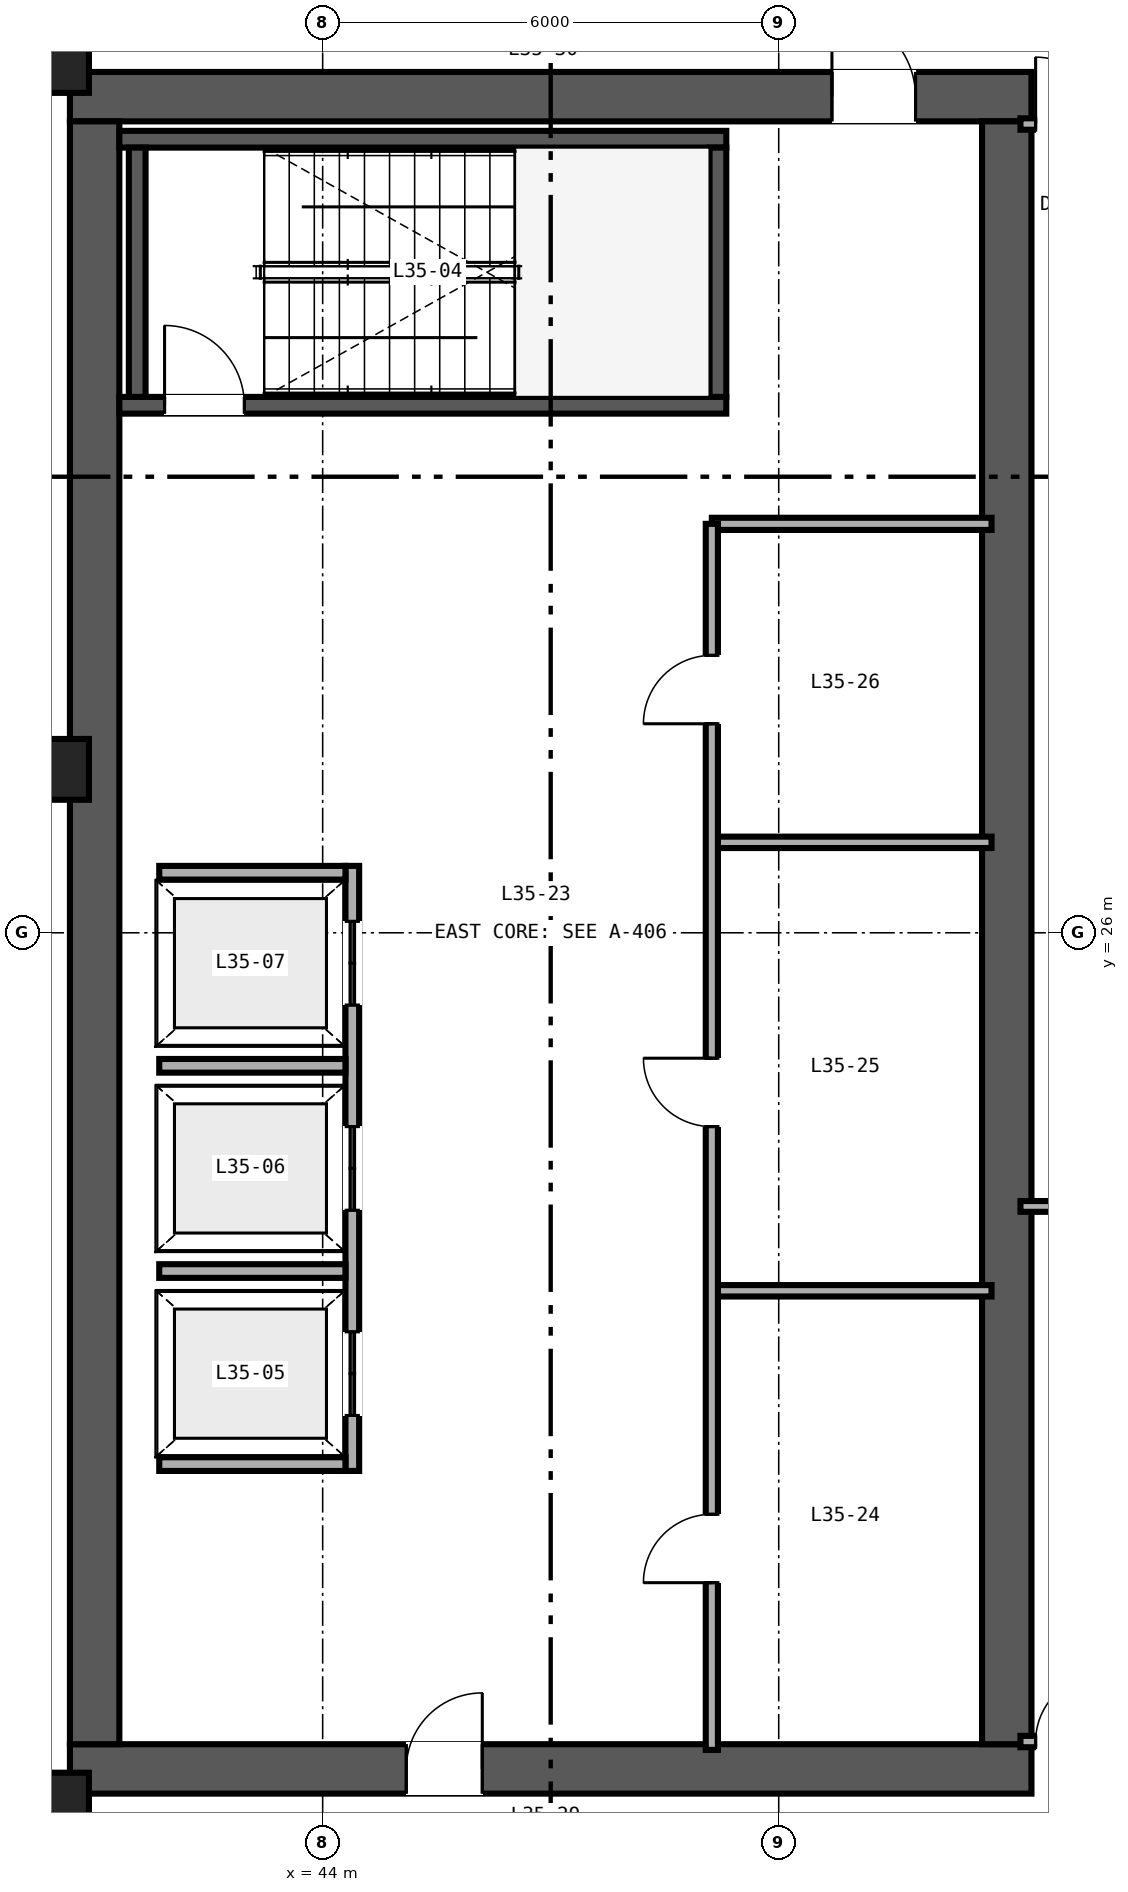
"""IFC4 building model, lengths in metres.
Left out: names, types, materials, properties, quantities, classifications, styles, units other than length and angle.
Written with IfcOpenShell. Run it as: python <this file> out.ifc"""

import sys

from ifc_helpers import new_model, si_unit, direction, frame, frame_2d, origin, origin_2d, place, context, subcontext, project, spatial, rectangle, hollow_rectangle, extrude, source, transform, mapped, element, fill, save


model = new_model("IFC4")
c1 = context("Model", 3, precision=1e-05, world=origin(), true_north=direction((0.0, 1.0)))
c2 = subcontext(c1, "Body", "Model", "MODEL_VIEW")
j1 = project(units=[si_unit("LENGTHUNIT", "METRE"), si_unit("PLANEANGLEUNIT", "RADIAN")], contexts=[c1])
p1 = place(None, origin())
s1 = spatial("IfcSite", under=j1, at=p1, CompositionType="ELEMENT")
p2 = place(p1, origin())
s2 = spatial("IfcBuilding", under=s1, at=p2, CompositionType="ELEMENT")
p3 = place(p2, frame((0.0, 0.0, 140.4)))
s3 = spatial("IfcBuildingStorey", under=s2, at=p3, CompositionType="ELEMENT", Elevation=140.4)
p4 = place(p3, frame((40.675, 15.0, 0.0), z_axis=(0.0, 0.0, 1.0), x_axis=(1.0, 0.0, 0.0)))
e1 = element("IfcWall", 1, at=p4, inside=s3, PredefinedType="SHEAR", context=c2, shape_type="SweptSolid", body=[
    extrude(rectangle(XDim=12.65, YDim=0.65, at=frame_2d((6.325, 0.0))), origin(), (0.0, 0.0, 1.0), 3.36),
])
p5 = place(p4, frame((4.425, 0.0, 0.0)))
e2 = element("IfcOpeningElement", 2, at=p5, cuts=e1, PredefinedType="OPENING", context=c2, shape_type="SweptSolid", body=[
    extrude(rectangle(XDim=1.0, YDim=2.15, at=frame_2d((0.5, 1.075))), frame((0.0, 0.335, 0.0), z_axis=(0.0, -1.0, 0.0), x_axis=(1.0, 0.0, 0.0)), (0.0, 0.0, 1.0), 0.67),
])
p6 = place(p3, frame((40.675, 37.0, 0.0), z_axis=(0.0, 0.0, 1.0), x_axis=(1.0, 0.0, 0.0)))
e3 = element("IfcWall", 3, at=p6, inside=s3, PredefinedType="SHEAR", context=c2, shape_type="SweptSolid", body=[
    extrude(rectangle(XDim=12.65, YDim=0.65, at=frame_2d((6.325, 0.0))), origin(), (0.0, 0.0, 1.0), 3.36),
])
p7 = place(p6, frame((10.025, 0.0, 0.0)))
e4 = element("IfcOpeningElement", 4, at=p7, cuts=e3, PredefinedType="OPENING", context=c2, shape_type="SweptSolid", body=[
    extrude(rectangle(XDim=1.1, YDim=2.15, at=frame_2d((0.55, 1.075))), frame((0.0, 0.335, 0.0), z_axis=(0.0, -1.0, 0.0), x_axis=(1.0, 0.0, 0.0)), (0.0, 0.0, 1.0), 0.67),
])
for number, where, z_axis, x_axis in (
    (5, (41.0, 15.325, 0.0), (0.0, 0.0, 1.0), (0.0, 1.0, 0.0)),
    (6, (53.0, 15.325, 0.0), (0.0, 0.0, 1.0), (0.0, 1.0, 0.0)),
):
    element("IfcWall", number, at=place(p3, frame(where, z_axis=z_axis, x_axis=x_axis)), inside=s3, PredefinedType="SHEAR", context=c2, shape_type="SweptSolid", body=[
        extrude(rectangle(XDim=21.35, YDim=0.65, at=frame_2d((10.675, 0.0))), origin(), (0.0, 0.0, 1.0), 3.36),
    ])
p8 = place(p3, frame((41.325, 32.94, 0.0), z_axis=(0.0, 0.0, 1.0), x_axis=(1.0, 0.0, 0.0)))
e7 = element("IfcWall", 7, at=p8, inside=s3, PredefinedType="SHEAR", context=c2, shape_type="SweptSolid", body=[
    extrude(rectangle(XDim=7.985, YDim=0.22, at=frame_2d((3.993, 0.0))), origin(), (0.0, 0.0, 1.0), 3.4),
])
p9 = place(p8, frame((0.595, 0.0, 0.0)))
e8 = element("IfcOpeningElement", 8, at=p9, cuts=e7, PredefinedType="OPENING", context=c2, shape_type="SweptSolid", body=[
    extrude(rectangle(XDim=1.05, YDim=2.15, at=frame_2d((0.525, 1.075))), frame((0.0, 0.12, 0.0), z_axis=(0.0, -1.0, 0.0), x_axis=(1.0, 0.0, 0.0)), (0.0, 0.0, 1.0), 0.24),
])
p10 = place(p3, frame((41.325, 36.44, 0.0), z_axis=(0.0, 0.0, 1.0), x_axis=(1.0, 0.0, 0.0)))
e9 = element("IfcWall", 9, at=p10, inside=s3, PredefinedType="SHEAR", context=c2, shape_type="SweptSolid", body=[
    extrude(rectangle(XDim=7.985, YDim=0.22, at=frame_2d((3.993, 0.0))), origin(), (0.0, 0.0, 1.0), 3.4),
])
for number, where, z_axis, x_axis in (
    (10, (41.56, 33.05, 0.0), (0.0, 0.0, 1.0), (0.0, 1.0, 0.0)),
    (11, (49.2, 33.05, 0.0), (0.0, 0.0, 1.0), (0.0, 1.0, 0.0)),
):
    element("IfcWall", number, at=place(p3, frame(where, z_axis=z_axis, x_axis=x_axis)), inside=s3, PredefinedType="SHEAR", context=c2, shape_type="SweptSolid", body=[
        extrude(rectangle(XDim=3.28, YDim=0.22, at=frame_2d((1.64, 0.0))), origin(), (0.0, 0.0, 1.0), 3.4),
    ])
m1 = source(origin(), c2, "Body", "SweptSolid", [
    extrude(hollow_rectangle(XDim=0.85, YDim=0.8, WallThickness=0.032, at=origin_2d()), origin(), (0.0, 0.0, 1.0), 3.36),
])
for number, where, z_axis, x_axis in (
    (12, (40.5, 14.55, 0.0), (0.0, 0.0, 1.0), (1.0, 0.0, 0.0)),
    (13, (40.5, 28.15, 0.0), (0.0, 0.0, 1.0), (1.0, 0.0, 0.0)),
    (14, (40.5, 37.45, 0.0), (0.0, 0.0, 1.0), (1.0, 0.0, 0.0)),
):
    element("IfcColumn", number, at=place(p3, frame(where, z_axis=z_axis, x_axis=x_axis)), inside=s3, PredefinedType="COLUMN", context=c2, shape_type="MappedRepresentation", body=[
        mapped(m1, transform((0.0, 0.0, 0.0), scale=1.0)),
    ])
p11 = place(p3, frame((44.39, 18.92, 0.0), z_axis=(0.0, 0.0, 1.0), x_axis=(0.0, 1.0, 0.0)))
e15 = element("IfcWall", 15, at=p11, inside=s3, PredefinedType="SOLIDWALL", context=c2, shape_type="SweptSolid", body=[
    extrude(rectangle(XDim=7.96, YDim=0.18, at=frame_2d((3.98, 0.0))), origin(), (0.0, 0.0, 1.0), 3.36),
])
p12 = place(p11, frame((0.73, 0.0, 0.0)))
e16 = element("IfcOpeningElement", 16, at=p12, cuts=e15, PredefinedType="OPENING", context=c2, shape_type="SweptSolid", body=[
    extrude(rectangle(XDim=1.1, YDim=2.2, at=frame_2d((0.55, 1.1))), frame((0.0, 0.1, 0.0), z_axis=(0.0, -1.0, 0.0), x_axis=(1.0, 0.0, 0.0)), (0.0, 0.0, 1.0), 0.2),
])
p13 = place(p11, frame((3.43, 0.0, 0.0)))
e17 = element("IfcOpeningElement", 17, at=p13, cuts=e15, PredefinedType="OPENING", context=c2, shape_type="SweptSolid", body=[
    extrude(rectangle(XDim=1.1, YDim=2.2, at=frame_2d((0.55, 1.1))), frame((0.0, 0.1, 0.0), z_axis=(0.0, -1.0, 0.0), x_axis=(1.0, 0.0, 0.0)), (0.0, 0.0, 1.0), 0.2),
])
p14 = place(p11, frame((6.13, 0.0, 0.0)))
e18 = element("IfcOpeningElement", 18, at=p14, cuts=e15, PredefinedType="OPENING", context=c2, shape_type="SweptSolid", body=[
    extrude(rectangle(XDim=1.1, YDim=2.2, at=frame_2d((0.55, 1.1))), frame((0.0, 0.1, 0.0), z_axis=(0.0, -1.0, 0.0), x_axis=(1.0, 0.0, 0.0)), (0.0, 0.0, 1.0), 0.2),
])
for number, where, z_axis, x_axis in (
    (19, (41.85, 19.01, 0.0), (0.0, 0.0, 1.0), (1.0, 0.0, 0.0)),
    (20, (41.85, 26.79, 0.0), (0.0, 0.0, 1.0), (1.0, 0.0, 0.0)),
    (21, (41.85, 21.55, 0.0), (0.0, 0.0, 1.0), (1.0, 0.0, 0.0)),
    (22, (41.85, 24.25, 0.0), (0.0, 0.0, 1.0), (1.0, 0.0, 0.0)),
):
    element("IfcWall", number, at=place(p3, frame(where, z_axis=z_axis, x_axis=x_axis)), inside=s3, PredefinedType="SOLIDWALL", context=c2, shape_type="SweptSolid", body=[
        extrude(rectangle(XDim=2.45, YDim=0.18, at=frame_2d((1.225, 0.0))), origin(), (0.0, 0.0, 1.0), 3.36),
    ])
p15 = place(p3, frame((49.12, 31.38, 0.0), z_axis=(0.0, 0.0, 1.0), x_axis=(1.0, 0.0, 0.0)))
e23 = element("IfcWall", 23, at=p15, inside=s3, PredefinedType="PARTITIONING", context=c2, shape_type="SweptSolid", body=[
    extrude(rectangle(XDim=3.68, YDim=0.16, at=frame_2d((1.84, 0.0))), origin(), (0.0, 0.0, 1.0), 2.36),
])
for number, where, z_axis, x_axis in (
    (24, (49.12, 21.29, 0.0), (0.0, 0.0, 1.0), (1.0, 0.0, 0.0)),
    (25, (49.12, 27.19, 0.0), (0.0, 0.0, 1.0), (1.0, 0.0, 0.0)),
):
    element("IfcWall", number, at=place(p3, frame(where, z_axis=z_axis, x_axis=x_axis)), inside=s3, PredefinedType="PARTITIONING", context=c2, shape_type="SweptSolid", body=[
        extrude(rectangle(XDim=3.68, YDim=0.15, at=frame_2d((1.84, 0.0))), origin(), (0.0, 0.0, 1.0), 3.36),
    ])
p16 = place(p3, frame((49.12, 15.25, 0.0), z_axis=(0.0, 0.0, 1.0), x_axis=(0.0, 1.0, 0.0)))
e26 = element("IfcWall", 26, at=p16, inside=s3, PredefinedType="PARTITIONING", context=c2, shape_type="SweptSolid", body=[
    extrude(rectangle(XDim=16.13, YDim=0.16, at=frame_2d((8.065, 0.0))), origin(), (0.0, 0.0, 1.0), 2.36),
])
p17 = place(p16, frame((2.2, 0.0, 0.0)))
e27 = element("IfcOpeningElement", 27, at=p17, cuts=e26, PredefinedType="OPENING", context=c2, shape_type="SweptSolid", body=[
    extrude(rectangle(XDim=0.9, YDim=2.15, at=frame_2d((0.45, 1.075))), frame((0.0, 0.09, 0.0), z_axis=(0.0, -1.0, 0.0), x_axis=(1.0, 0.0, 0.0)), (0.0, 0.0, 1.0), 0.18),
])
p18 = place(p16, frame((8.2, 0.0, 0.0)))
e28 = element("IfcOpeningElement", 28, at=p18, cuts=e26, PredefinedType="OPENING", context=c2, shape_type="SweptSolid", body=[
    extrude(rectangle(XDim=0.9, YDim=2.15, at=frame_2d((0.45, 1.075))), frame((0.0, 0.09, 0.0), z_axis=(0.0, -1.0, 0.0), x_axis=(1.0, 0.0, 0.0)), (0.0, 0.0, 1.0), 0.18),
])
p19 = place(p16, frame((13.5, 0.0, 0.0)))
e29 = element("IfcOpeningElement", 29, at=p19, cuts=e26, PredefinedType="OPENING", context=c2, shape_type="SweptSolid", body=[
    extrude(rectangle(XDim=0.9, YDim=2.15, at=frame_2d((0.45, 1.075))), frame((0.0, 0.09, 0.0), z_axis=(0.0, -1.0, 0.0), x_axis=(1.0, 0.0, 0.0)), (0.0, 0.0, 1.0), 0.18),
])
p20 = place(p3, frame((53.18, 15.36, 0.0), z_axis=(0.0, 0.0, 1.0), x_axis=(1.0, 0.0, 0.0)))
e30 = element("IfcWall", 30, at=p20, inside=s3, PredefinedType="PARTITIONING", context=c2, shape_type="SweptSolid", body=[
    extrude(rectangle(XDim=2.66, YDim=0.15, at=frame_2d((1.33, 0.0))), origin(), (0.0, 0.0, 1.0), 2.581),
])
p21 = place(p20, frame((0.2, 0.0, 0.0)))
e31 = element("IfcOpeningElement", 31, at=p21, cuts=e30, PredefinedType="OPENING", context=c2, shape_type="SweptSolid", body=[
    extrude(rectangle(XDim=0.88, YDim=2.15, at=frame_2d((0.44, 1.075))), frame((0.0, 0.085, 0.0), z_axis=(0.0, -1.0, 0.0), x_axis=(1.0, 0.0, 0.0)), (0.0, 0.0, 1.0), 0.17),
])
p22 = place(p3, frame((53.18, 36.64, 0.0), z_axis=(0.0, 0.0, 1.0), x_axis=(1.0, 0.0, 0.0)))
e32 = element("IfcWall", 32, at=p22, inside=s3, PredefinedType="PARTITIONING", context=c2, shape_type="SweptSolid", body=[
    extrude(rectangle(XDim=2.66, YDim=0.15, at=frame_2d((1.33, 0.0))), origin(), (0.0, 0.0, 1.0), 2.743),
])
p23 = place(p22, frame((0.2, 0.0, 0.0)))
e33 = element("IfcOpeningElement", 33, at=p23, cuts=e32, PredefinedType="OPENING", context=c2, shape_type="SweptSolid", body=[
    extrude(rectangle(XDim=0.88, YDim=2.15, at=frame_2d((0.44, 1.075))), frame((0.0, 0.085, 0.0), z_axis=(0.0, -1.0, 0.0), x_axis=(1.0, 0.0, 0.0)), (0.0, 0.0, 1.0), 0.17),
])
p24 = place(p3, frame((53.18, 22.4, 0.0), z_axis=(0.0, 0.0, 1.0), x_axis=(1.0, 0.0, 0.0)))
e34 = element("IfcWall", 34, at=p24, inside=s3, PredefinedType="PARTITIONING", context=c2, shape_type="SweptSolid", body=[
    extrude(rectangle(XDim=2.66, YDim=0.142, at=frame_2d((1.33, 0.0))), origin(), (0.0, 0.0, 1.0), 2.581),
])
m2 = source(origin(), c2, "Body", "SweptSolid", [
    extrude(rectangle(XDim=1.05, YDim=2.15, at=frame_2d((0.525, 1.075))), frame((0.0, 0.025, 0.0), z_axis=(0.0, -1.0, 0.0), x_axis=(1.0, 0.0, 0.0)), (0.0, 0.0, 1.0), 0.05),
])
p25 = place(p9, origin())
e35 = element("IfcDoor", 35, at=p25, inside=s3, OperationType="SINGLE_SWING_LEFT", PredefinedType="DOOR", context=c2, shape_type="MappedRepresentation", body=[
    mapped(m2, transform((0.0, 0.0, 0.0), scale=1.0)),
])
fill(e8, e35)
m3 = source(origin(), c2, "Body", "SweptSolid", [
    extrude(rectangle(XDim=1.1, YDim=2.2, at=frame_2d((0.55, 1.1))), frame((0.0, 0.025, 0.0), z_axis=(0.0, -1.0, 0.0), x_axis=(1.0, 0.0, 0.0)), (0.0, 0.0, 1.0), 0.05),
])
p26 = place(p12, origin())
e36 = element("IfcDoor", 36, at=p26, inside=s3, OperationType="DOUBLE_DOOR_SLIDING", PredefinedType="DOOR", context=c2, shape_type="MappedRepresentation", body=[
    mapped(m3, transform((0.0, 0.0, 0.0), scale=1.0)),
])
fill(e16, e36)
p27 = place(p13, origin())
e37 = element("IfcDoor", 37, at=p27, inside=s3, OperationType="DOUBLE_DOOR_SLIDING", PredefinedType="DOOR", context=c2, shape_type="MappedRepresentation", body=[
    mapped(m3, transform((0.0, 0.0, 0.0), scale=1.0)),
])
fill(e17, e37)
p28 = place(p14, origin())
e38 = element("IfcDoor", 38, at=p28, inside=s3, OperationType="DOUBLE_DOOR_SLIDING", PredefinedType="DOOR", context=c2, shape_type="MappedRepresentation", body=[
    mapped(m3, transform((0.0, 0.0, 0.0), scale=1.0)),
])
fill(e18, e38)
m4 = source(origin(), c2, "Body", "SweptSolid", [
    extrude(rectangle(XDim=1.0, YDim=2.15, at=frame_2d((0.5, 1.075))), frame((0.0, 0.025, 0.0), z_axis=(0.0, -1.0, 0.0), x_axis=(1.0, 0.0, 0.0)), (0.0, 0.0, 1.0), 0.05),
])
p29 = place(p5, origin())
e39 = element("IfcDoor", 39, at=p29, inside=s3, OperationType="SINGLE_SWING_RIGHT", PredefinedType="DOOR", context=c2, shape_type="MappedRepresentation", body=[
    mapped(m4, transform((0.0, 0.0, 0.0), scale=1.0)),
])
fill(e2, e39)
m5 = source(origin(), c2, "Body", "SweptSolid", [
    extrude(rectangle(XDim=1.1, YDim=2.15, at=frame_2d((0.55, 1.075))), frame((0.0, 0.025, 0.0), z_axis=(0.0, -1.0, 0.0), x_axis=(1.0, 0.0, 0.0)), (0.0, 0.0, 1.0), 0.05),
])
p30 = place(p7, origin())
e40 = element("IfcDoor", 40, at=p30, inside=s3, OperationType="SINGLE_SWING_LEFT", PredefinedType="DOOR", context=c2, shape_type="MappedRepresentation", body=[
    mapped(m5, transform((0.0, 0.0, 0.0), scale=1.0)),
])
fill(e4, e40)
m6 = source(origin(), c2, "Body", "SweptSolid", [
    extrude(rectangle(XDim=0.9, YDim=2.15, at=frame_2d((0.45, 1.075))), frame((0.0, 0.025, 0.0), z_axis=(0.0, -1.0, 0.0), x_axis=(1.0, 0.0, 0.0)), (0.0, 0.0, 1.0), 0.05),
])
p31 = place(p17, origin())
e41 = element("IfcDoor", 41, at=p31, inside=s3, OperationType="SINGLE_SWING_LEFT", PredefinedType="DOOR", context=c2, shape_type="MappedRepresentation", body=[
    mapped(m6, transform((0.0, 0.0, 0.0), scale=1.0)),
])
fill(e27, e41)
p32 = place(p18, origin())
e42 = element("IfcDoor", 42, at=p32, inside=s3, OperationType="SINGLE_SWING_RIGHT", PredefinedType="DOOR", context=c2, shape_type="MappedRepresentation", body=[
    mapped(m6, transform((0.0, 0.0, 0.0), scale=1.0)),
])
fill(e28, e42)
p33 = place(p19, origin())
e43 = element("IfcDoor", 43, at=p33, inside=s3, OperationType="SINGLE_SWING_LEFT", PredefinedType="DOOR", context=c2, shape_type="MappedRepresentation", body=[
    mapped(m6, transform((0.0, 0.0, 0.0), scale=1.0)),
])
fill(e29, e43)
m7 = source(origin(), c2, "Body", "SweptSolid", [
    extrude(rectangle(XDim=0.88, YDim=2.15, at=frame_2d((0.44, 1.075))), frame((0.0, 0.025, 0.0), z_axis=(0.0, -1.0, 0.0), x_axis=(1.0, 0.0, 0.0)), (0.0, 0.0, 1.0), 0.05),
])
p34 = place(p21, origin())
e44 = element("IfcDoor", 44, at=p34, inside=s3, OperationType="SINGLE_SWING_RIGHT", PredefinedType="DOOR", context=c2, shape_type="MappedRepresentation", body=[
    mapped(m7, transform((0.0, 0.0, 0.0), scale=1.0)),
])
fill(e31, e44)
p35 = place(p23, origin())
e45 = element("IfcDoor", 45, at=p35, inside=s3, OperationType="SINGLE_SWING_LEFT", PredefinedType="DOOR", context=c2, shape_type="MappedRepresentation", body=[
    mapped(m7, transform((0.0, 0.0, 0.0), scale=1.0)),
])
fill(e33, e45)
save(model, sys.argv[1])
